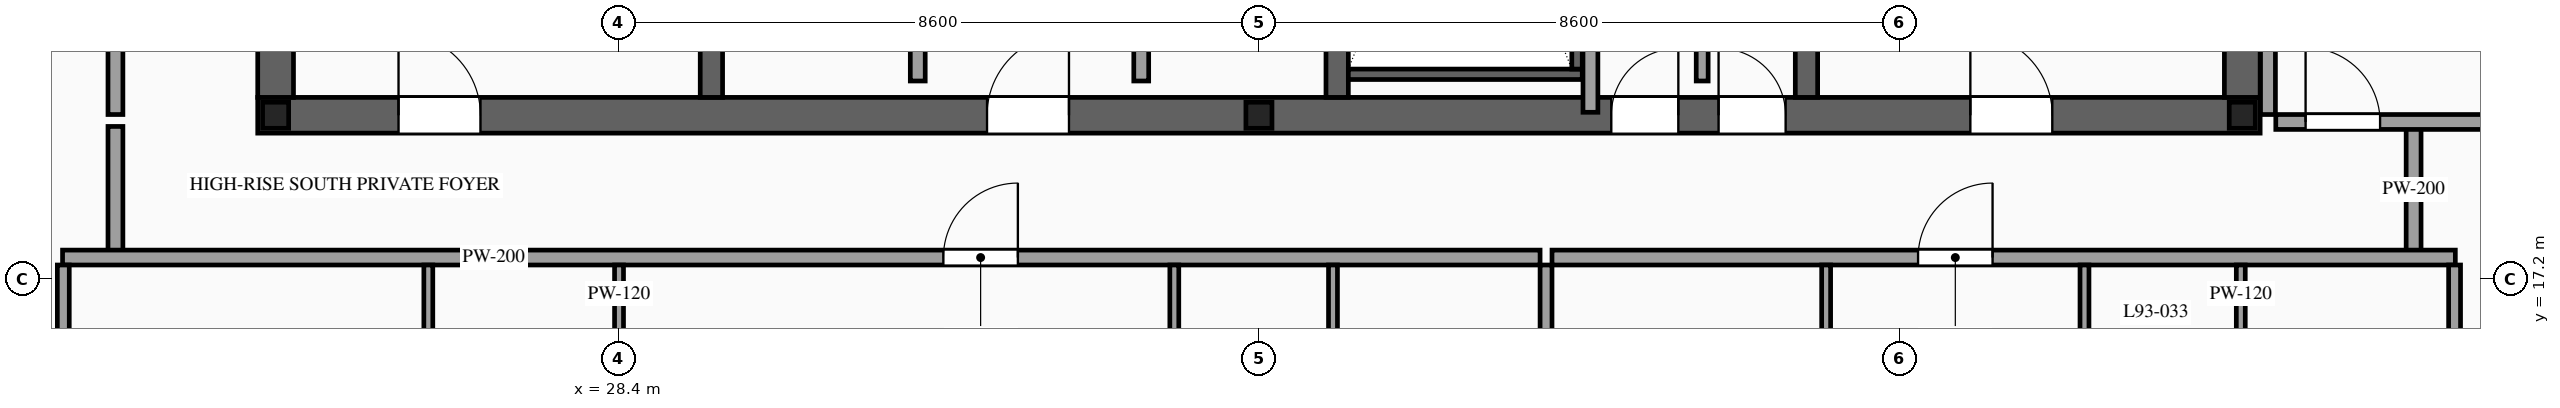
"""IFC4 building model, lengths in metres.
Left out: names, types, materials, properties, quantities, classifications, styles, units other than length and angle.
Written with IfcOpenShell. Run it as: python <this file> out.ifc"""

import sys

from ifc_helpers import new_model, si_unit, direction, frame, frame_2d, origin, origin_2d, place, context, subcontext, project, spatial, rectangle, i_section, extrude, source, transform, mapped, element, fill, save


model = new_model("IFC4")
c1 = context("Model", 3, precision=1e-05, world=origin(), true_north=direction((0.0, 1.0)))
c2 = subcontext(c1, "Body", "Model", "MODEL_VIEW")
j1 = project(units=[si_unit("LENGTHUNIT", "METRE"), si_unit("PLANEANGLEUNIT", "RADIAN")], contexts=[c1])
p1 = place(None, origin())
s1 = spatial("IfcSite", under=j1, at=p1, CompositionType="ELEMENT")
p2 = place(p1, origin())
s2 = spatial("IfcBuilding", under=s1, at=p2, CompositionType="ELEMENT")
p3 = place(p2, frame((0.0, 0.0, 347.2)))
s3 = spatial("IfcBuildingStorey", under=s2, at=p3, CompositionType="ELEMENT", Elevation=347.2)
p4 = place(p3, frame((23.56, 19.4, 0.0), z_axis=(0.0, 0.0, 1.0), x_axis=(1.0, 0.0, 0.0)))
e1 = element("IfcWall", 1, at=p4, inside=s3, PredefinedType="SHEAR", context=c2, shape_type="SweptSolid", body=[
    extrude(rectangle(XDim=26.88, YDim=0.48, at=frame_2d((13.44, 0.0))), origin(), (0.0, 0.0, 1.0), 4.0),
])
p5 = place(p4, frame((1.89, 0.0, 0.0)))
e2 = element("IfcOpeningElement", 2, at=p5, cuts=e1, PredefinedType="OPENING", context=c2, shape_type="SweptSolid", body=[
    extrude(rectangle(XDim=1.1, YDim=2.2, at=frame_2d((0.55, 1.1))), frame((0.0, 0.255, 0.0), z_axis=(0.0, -1.0, 0.0), x_axis=(1.0, 0.0, 0.0)), (0.0, 0.0, 1.0), 0.51),
])
p6 = place(p4, frame((9.79, 0.0, 0.0)))
e3 = element("IfcOpeningElement", 3, at=p6, cuts=e1, PredefinedType="OPENING", context=c2, shape_type="SweptSolid", body=[
    extrude(rectangle(XDim=1.1, YDim=2.2, at=frame_2d((0.55, 1.1))), frame((0.0, 0.255, 0.0), z_axis=(0.0, -1.0, 0.0), x_axis=(1.0, 0.0, 0.0)), (0.0, 0.0, 1.0), 0.51),
])
p7 = place(p4, frame((22.99, 0.0, 0.0)))
e4 = element("IfcOpeningElement", 4, at=p7, cuts=e1, PredefinedType="OPENING", context=c2, shape_type="SweptSolid", body=[
    extrude(rectangle(XDim=1.1, YDim=2.2, at=frame_2d((0.55, 1.1))), frame((0.0, 0.255, 0.0), z_axis=(0.0, -1.0, 0.0), x_axis=(1.0, 0.0, 0.0)), (0.0, 0.0, 1.0), 0.51),
])
p8 = place(p4, frame((19.61, 0.0, 0.0)))
e5 = element("IfcOpeningElement", 5, at=p8, cuts=e1, PredefinedType="OPENING", context=c2, shape_type="SweptSolid", body=[
    extrude(rectangle(XDim=0.9, YDim=2.15, at=frame_2d((0.45, 1.075))), frame((0.0, 0.255, 0.0), z_axis=(0.0, -1.0, 0.0), x_axis=(1.0, 0.0, 0.0)), (0.0, 0.0, 1.0), 0.51),
])
p9 = place(p4, frame((18.17, 0.0, 0.0)))
e6 = element("IfcOpeningElement", 6, at=p9, cuts=e1, PredefinedType="OPENING", context=c2, shape_type="SweptSolid", body=[
    extrude(rectangle(XDim=0.9, YDim=2.15, at=frame_2d((0.45, 1.075))), frame((0.0, 0.255, 0.0), z_axis=(0.0, -1.0, 0.0), x_axis=(1.0, 0.0, 0.0)), (0.0, 0.0, 1.0), 0.51),
])
m1 = source(origin(), c2, "Body", "SweptSolid", [
    extrude(rectangle(XDim=12.32, YDim=0.48, at=frame_2d((6.16, 0.0))), origin(), (0.0, 0.0, 1.0), 4.0),
])
for number, where, z_axis, x_axis in (
    (7, (23.8, 19.64, 0.0), (0.0, 0.0, 1.0), (0.0, 1.0, 0.0)),
    (8, (50.2, 19.64, 0.0), (0.0, 0.0, 1.0), (0.0, 1.0, 0.0)),
):
    element("IfcWall", number, at=place(p3, frame(where, z_axis=z_axis, x_axis=x_axis)), inside=s3, PredefinedType="SHEAR", context=c2, shape_type="MappedRepresentation", body=[
        mapped(m1, transform((0.0, 0.0, 0.0), scale=1.0)),
    ])
m2 = source(origin(), c2, "Body", "SweptSolid", [
    extrude(rectangle(XDim=12.32, YDim=0.3, at=frame_2d((6.16, 0.0))), origin(), (0.0, 0.0, 1.0), 4.0),
])
for number, where, z_axis, x_axis in (
    (9, (29.65, 19.64, 0.0), (0.0, 0.0, 1.0), (0.0, 1.0, 0.0)),
    (10, (38.05, 19.64, 0.0), (0.0, 0.0, 1.0), (0.0, 1.0, 0.0)),
):
    element("IfcWall", number, at=place(p3, frame(where, z_axis=z_axis, x_axis=x_axis)), inside=s3, PredefinedType="SOLIDWALL", context=c2, shape_type="MappedRepresentation", body=[
        mapped(m2, transform((0.0, 0.0, 0.0), scale=1.0)),
    ])
p10 = place(p3, frame((44.35, 19.64, 0.0), z_axis=(0.0, 0.0, 1.0), x_axis=(0.0, 1.0, 0.0)))
e11 = element("IfcWall", 11, at=p10, inside=s3, PredefinedType="SOLIDWALL", context=c2, shape_type="SweptSolid", body=[
    extrude(rectangle(XDim=12.32, YDim=0.3, at=frame_2d((6.16, 0.0))), origin(), (0.0, 0.0, 1.0), 4.0),
])
p11 = place(p10, frame((6.56, 0.0, 0.0)))
e12 = element("IfcOpeningElement", 12, at=p11, cuts=e11, PredefinedType="OPENING", context=c2, shape_type="SweptSolid", body=[
    extrude(rectangle(XDim=1.1, YDim=2.2, at=frame_2d((0.55, 1.1))), frame((0.0, 0.165, 0.0), z_axis=(0.0, -1.0, 0.0), x_axis=(1.0, 0.0, 0.0)), (0.0, 0.0, 1.0), 0.33),
])
p12 = place(p10, frame((8.66, 0.0, 0.0)))
e13 = element("IfcOpeningElement", 13, at=p12, cuts=e11, PredefinedType="OPENING", context=c2, shape_type="SweptSolid", body=[
    extrude(rectangle(XDim=1.1, YDim=2.2, at=frame_2d((0.55, 1.1))), frame((0.0, 0.165, 0.0), z_axis=(0.0, -1.0, 0.0), x_axis=(1.0, 0.0, 0.0)), (0.0, 0.0, 1.0), 0.33),
])
p13 = place(p10, frame((10.76, 0.0, 0.0)))
e14 = element("IfcOpeningElement", 14, at=p13, cuts=e11, PredefinedType="OPENING", context=c2, shape_type="SweptSolid", body=[
    extrude(rectangle(XDim=1.1, YDim=2.2, at=frame_2d((0.55, 1.1))), frame((0.0, 0.165, 0.0), z_axis=(0.0, -1.0, 0.0), x_axis=(1.0, 0.0, 0.0)), (0.0, 0.0, 1.0), 0.33),
])
m3 = source(origin(), c2, "Body", "SweptSolid", [
    extrude(i_section(OverallWidth=0.35, OverallDepth=0.35, WebThickness=0.012, FlangeThickness=0.019, at=origin_2d()), origin(), (0.0, 0.0, 1.0), 4.0),
])
for number, where, z_axis, x_axis in (
    (15, (23.8, 19.4, 0.0), (0.0, 0.0, 1.0), (1.0, 0.0, 0.0)),
    (16, (37.0, 19.4, 0.0), (0.0, 0.0, 1.0), (1.0, 0.0, 0.0)),
    (17, (50.2, 19.4, 0.0), (0.0, 0.0, 1.0), (1.0, 0.0, 0.0)),
):
    element("IfcColumn", number, at=place(p3, frame(where, z_axis=z_axis, x_axis=x_axis)), inside=s3, PredefinedType="COLUMN", context=c2, shape_type="MappedRepresentation", body=[
        mapped(m3, transform((0.0, 0.0, 0.0), scale=1.0)),
    ])
m4 = source(origin(), c2, "Body", "SweptSolid", [
    extrude(rectangle(XDim=3.14, YDim=0.14, at=frame_2d((1.57, 0.0))), origin(), (0.0, 0.0, 1.0), 3.7),
])
p14 = place(p3, frame((38.2, 19.95, 0.0), z_axis=(0.0, 0.0, 1.0), x_axis=(1.0, 0.0, 0.0)))
e18 = element("IfcWall", 18, at=p14, inside=s3, PredefinedType="SOLIDWALL", context=c2, shape_type="MappedRepresentation", body=[
    mapped(m4, transform((0.0, 0.0, 0.0), scale=1.0)),
])
m5 = source(origin(), c2, "Body", "SweptSolid", [
    extrude(rectangle(XDim=8.94, YDim=0.14, at=frame_2d((4.47, 0.0))), origin(), (0.0, 0.0, 1.0), 3.7),
])
p15 = place(p3, frame((41.27, 20.02, 0.0), z_axis=(0.0, 0.0, 1.0), x_axis=(0.0, 1.0, 0.0)))
e19 = element("IfcWall", 19, at=p15, inside=s3, PredefinedType="SOLIDWALL", context=c2, shape_type="MappedRepresentation", body=[
    mapped(m5, transform((0.0, 0.0, 0.0), scale=1.0)),
])
p16 = place(p3, frame((32.42, 19.86, 0.0), z_axis=(0.0, 0.0, 1.0), x_axis=(0.0, 1.0, 0.0)))
e20 = element("IfcWall", 20, at=p16, inside=s3, PredefinedType="PARTITIONING", context=c2, shape_type="SweptSolid", body=[
    extrude(rectangle(XDim=7.94, YDim=0.2, at=frame_2d((3.97, 0.0))), origin(), (0.0, 0.0, 1.0), 3.7),
])
p17 = place(p16, frame((3.52, 0.0, 0.0)))
e21 = element("IfcOpeningElement", 21, at=p17, cuts=e20, PredefinedType="OPENING", context=c2, shape_type="SweptSolid", body=[
    extrude(rectangle(XDim=0.9, YDim=2.15, at=frame_2d((0.45, 1.075))), frame((0.0, 0.115, 0.0), z_axis=(0.0, -1.0, 0.0), x_axis=(1.0, 0.0, 0.0)), (0.0, 0.0, 1.0), 0.23),
])
p18 = place(p3, frame((35.42, 19.86, 0.0), z_axis=(0.0, 0.0, 1.0), x_axis=(0.0, 1.0, 0.0)))
e22 = element("IfcWall", 22, at=p18, inside=s3, PredefinedType="PARTITIONING", context=c2, shape_type="SweptSolid", body=[
    extrude(rectangle(XDim=6.34, YDim=0.2, at=frame_2d((3.17, 0.0))), origin(), (0.0, 0.0, 1.0), 3.7),
])
p19 = place(p18, frame((2.72, 0.0, 0.0)))
e23 = element("IfcOpeningElement", 23, at=p19, cuts=e22, PredefinedType="OPENING", context=c2, shape_type="SweptSolid", body=[
    extrude(rectangle(XDim=0.9, YDim=2.15, at=frame_2d((0.45, 1.075))), frame((0.0, 0.115, 0.0), z_axis=(0.0, -1.0, 0.0), x_axis=(1.0, 0.0, 0.0)), (0.0, 0.0, 1.0), 0.23),
])
m6 = source(origin(), c2, "Body", "SweptSolid", [
    extrude(rectangle(XDim=1.34, YDim=0.16, at=frame_2d((0.67, 0.0))), origin(), (0.0, 0.0, 1.0), 3.7),
])
p20 = place(p3, frame((42.95, 19.86, 0.0), z_axis=(0.0, 0.0, 1.0), x_axis=(0.0, 1.0, 0.0)))
e24 = element("IfcWall", 24, at=p20, inside=s3, PredefinedType="PARTITIONING", context=c2, shape_type="MappedRepresentation", body=[
    mapped(m6, transform((0.0, 0.0, 0.0), scale=1.0)),
])
m7 = source(origin(), c2, "Body", "SweptSolid", [
    extrude(rectangle(XDim=6.06, YDim=0.2, at=frame_2d((3.03, 0.0))), origin(), (0.0, 0.0, 1.0), 3.7),
])
p21 = place(p3, frame((41.45, 19.44, 0.0), z_axis=(0.0, 0.0, 1.0), x_axis=(0.0, 1.0, 0.0)))
e25 = element("IfcWall", 25, at=p21, inside=s3, PredefinedType="PARTITIONING", context=c2, shape_type="MappedRepresentation", body=[
    mapped(m7, transform((0.0, 0.0, 0.0), scale=1.0)),
])
m8 = source(origin(), c2, "Body", "SweptSolid", [
    extrude(rectangle(XDim=1.7, YDim=0.2, at=frame_2d((0.85, 0.0))), origin(), (0.0, 0.0, 1.0), 3.7),
])
for number, where, z_axis, x_axis in (
    (26, (21.65, 17.55, 0.0), (0.0, 0.0, 1.0), (0.0, 1.0, 0.0)),
    (27, (52.5, 17.55, 0.0), (0.0, 0.0, 1.0), (0.0, 1.0, 0.0)),
):
    element("IfcWall", number, at=place(p3, frame(where, z_axis=z_axis, x_axis=x_axis)), inside=s3, PredefinedType="PARTITIONING", context=c2, shape_type="MappedRepresentation", body=[
        mapped(m8, transform((0.0, 0.0, 0.0), scale=1.0)),
    ])
p22 = place(p3, frame((20.94, 17.49, 0.0), z_axis=(0.0, 0.0, 1.0), x_axis=(1.0, 0.0, 0.0)))
e28 = element("IfcWall", 28, at=p22, inside=s3, PredefinedType="PARTITIONING", context=c2, shape_type="SweptSolid", body=[
    extrude(rectangle(XDim=19.834, YDim=0.2, at=frame_2d((9.917, 0.0))), origin(), (0.0, 0.0, 1.0), 3.7),
])
p23 = place(p22, frame((11.824, 0.0, 0.0)))
e29 = element("IfcOpeningElement", 29, at=p23, cuts=e28, PredefinedType="OPENING", context=c2, shape_type="SweptSolid", body=[
    extrude(rectangle(XDim=1.0, YDim=2.2, at=frame_2d((0.5, 1.1))), frame((0.0, 0.115, 0.0), z_axis=(0.0, -1.0, 0.0), x_axis=(1.0, 0.0, 0.0)), (0.0, 0.0, 1.0), 0.23),
])
m9 = source(origin(), c2, "Body", "SweptSolid", [
    extrude(rectangle(XDim=10.54, YDim=0.16, at=frame_2d((5.27, 0.0))), origin(), (0.0, 0.0, 1.0), 3.7),
])
p24 = place(p3, frame((40.854, 6.85, 0.0), z_axis=(0.0, 0.0, 1.0), x_axis=(0.0, 1.0, 0.0)))
e30 = element("IfcWall", 30, at=p24, inside=s3, PredefinedType="PARTITIONING", context=c2, shape_type="MappedRepresentation", body=[
    mapped(m9, transform((0.0, 0.0, 0.0), scale=1.0)),
])
m10 = source(origin(), c2, "Body", "SweptSolid", [
    extrude(rectangle(XDim=2.9, YDim=0.12, at=frame_2d((1.45, 0.0))), origin(), (0.0, 0.0, 1.0), 3.7),
])
p25 = place(p3, frame((25.85, 14.49, 0.0), z_axis=(0.0, 0.0, 1.0), x_axis=(0.0, 1.0, 0.0)))
e31 = element("IfcWall", 31, at=p25, inside=s3, PredefinedType="PARTITIONING", context=c2, shape_type="MappedRepresentation", body=[
    mapped(m10, transform((0.0, 0.0, 0.0), scale=1.0)),
])
p26 = place(p3, frame((28.41, 14.49, 0.0), z_axis=(0.0, 0.0, 1.0), x_axis=(0.0, 1.0, 0.0)))
e32 = element("IfcWall", 32, at=p26, inside=s3, PredefinedType="PARTITIONING", context=c2, shape_type="SweptSolid", body=[
    extrude(rectangle(XDim=2.9, YDim=0.12, at=frame_2d((1.45, 0.0))), origin(), (0.0, 0.0, 1.0), 3.7),
])
p27 = place(p26, frame((1.025, 0.0, 0.0)))
e33 = element("IfcOpeningElement", 33, at=p27, cuts=e32, PredefinedType="OPENING", context=c2, shape_type="SweptSolid", body=[
    extrude(rectangle(XDim=0.85, YDim=2.1, at=frame_2d((0.425, 1.05))), frame((0.0, 0.075, 0.0), z_axis=(0.0, -1.0, 0.0), x_axis=(1.0, 0.0, 0.0)), (0.0, 0.0, 1.0), 0.15),
])
for number, where, z_axis, x_axis in (
    (34, (37.994, 14.49, 0.0), (0.0, 0.0, 1.0), (0.0, 1.0, 0.0)),
    (35, (35.864, 14.49, 0.0), (0.0, 0.0, 1.0), (0.0, 1.0, 0.0)),
):
    element("IfcWall", number, at=place(p3, frame(where, z_axis=z_axis, x_axis=x_axis)), inside=s3, PredefinedType="PARTITIONING", context=c2, shape_type="MappedRepresentation", body=[
        mapped(m10, transform((0.0, 0.0, 0.0), scale=1.0)),
    ])
p28 = place(p3, frame((40.934, 17.49, 0.0), z_axis=(0.0, 0.0, 1.0), x_axis=(1.0, 0.0, 0.0)))
e36 = element("IfcWall", 36, at=p28, inside=s3, PredefinedType="PARTITIONING", context=c2, shape_type="SweptSolid", body=[
    extrude(rectangle(XDim=12.126, YDim=0.2, at=frame_2d((6.063, 0.0))), origin(), (0.0, 0.0, 1.0), 3.7),
])
p29 = place(p28, frame((4.914, 0.0, 0.0)))
e37 = element("IfcOpeningElement", 37, at=p29, cuts=e36, PredefinedType="OPENING", context=c2, shape_type="SweptSolid", body=[
    extrude(rectangle(XDim=1.0, YDim=2.2, at=frame_2d((0.5, 1.1))), frame((0.0, 0.115, 0.0), z_axis=(0.0, -1.0, 0.0), x_axis=(1.0, 0.0, 0.0)), (0.0, 0.0, 1.0), 0.23),
])
m11 = source(origin(), c2, "Body", "SweptSolid", [
    extrude(rectangle(XDim=10.39, YDim=0.16, at=frame_2d((5.195, 0.0))), origin(), (0.0, 0.0, 1.0), 3.7),
])
for number, where, z_axis, x_axis in (
    (38, (20.95, 7.0, 0.0), (0.0, 0.0, 1.0), (0.0, 1.0, 0.0)),
    (39, (53.05, 7.0, 0.0), (0.0, 0.0, 1.0), (0.0, 1.0, 0.0)),
):
    element("IfcWall", number, at=place(p3, frame(where, z_axis=z_axis, x_axis=x_axis)), inside=s3, PredefinedType="PARTITIONING", context=c2, shape_type="MappedRepresentation", body=[
        mapped(m11, transform((0.0, 0.0, 0.0), scale=1.0)),
    ])
p30 = place(p3, frame((44.614, 14.49, 0.0), z_axis=(0.0, 0.0, 1.0), x_axis=(0.0, 1.0, 0.0)))
e40 = element("IfcWall", 40, at=p30, inside=s3, PredefinedType="PARTITIONING", context=c2, shape_type="MappedRepresentation", body=[
    mapped(m10, transform((0.0, 0.0, 0.0), scale=1.0)),
])
p31 = place(p3, frame((50.18, 14.49, 0.0), z_axis=(0.0, 0.0, 1.0), x_axis=(0.0, 1.0, 0.0)))
e41 = element("IfcWall", 41, at=p31, inside=s3, PredefinedType="PARTITIONING", context=c2, shape_type="SweptSolid", body=[
    extrude(rectangle(XDim=2.9, YDim=0.12, at=frame_2d((1.45, 0.0))), origin(), (0.0, 0.0, 1.0), 3.245),
])
p32 = place(p31, frame((1.025, 0.0, 0.0)))
e42 = element("IfcOpeningElement", 42, at=p32, cuts=e41, PredefinedType="OPENING", context=c2, shape_type="SweptSolid", body=[
    extrude(rectangle(XDim=0.85, YDim=2.1, at=frame_2d((0.425, 1.05))), frame((0.0, 0.075, 0.0), z_axis=(0.0, -1.0, 0.0), x_axis=(1.0, 0.0, 0.0)), (0.0, 0.0, 1.0), 0.15),
])
p33 = place(p3, frame((48.082, 14.49, 0.0), z_axis=(0.0, 0.0, 1.0), x_axis=(0.0, 1.0, 0.0)))
e43 = element("IfcWall", 43, at=p33, inside=s3, PredefinedType="PARTITIONING", context=c2, shape_type="SweptSolid", body=[
    extrude(rectangle(XDim=2.9, YDim=0.12, at=frame_2d((1.45, 0.0))), origin(), (0.0, 0.0, 1.0), 3.7),
])
p34 = place(p33, frame((1.025, 0.0, 0.0)))
e44 = element("IfcOpeningElement", 44, at=p34, cuts=e43, PredefinedType="OPENING", context=c2, shape_type="SweptSolid", body=[
    extrude(rectangle(XDim=0.85, YDim=2.1, at=frame_2d((0.425, 1.05))), frame((0.0, 0.075, 0.0), z_axis=(0.0, -1.0, 0.0), x_axis=(1.0, 0.0, 0.0)), (0.0, 0.0, 1.0), 0.15),
])
p35 = place(p3, frame((21.65, 19.41, 0.0), z_axis=(0.0, 0.0, 1.0), x_axis=(0.0, 1.0, 0.0)))
e45 = element("IfcWall", 45, at=p35, inside=s3, PredefinedType="PARTITIONING", context=c2, shape_type="SweptSolid", body=[
    extrude(rectangle(XDim=12.78, YDim=0.2, at=frame_2d((6.39, 0.0))), origin(), (0.0, 0.0, 1.0), 3.7),
])
p36 = place(p35, frame((5.89, 0.0, 0.0)))
e46 = element("IfcOpeningElement", 46, at=p36, cuts=e45, PredefinedType="OPENING", context=c2, shape_type="SweptSolid", body=[
    extrude(rectangle(XDim=1.0, YDim=2.2, at=frame_2d((0.5, 1.1))), frame((0.0, 0.115, 0.0), z_axis=(0.0, -1.0, 0.0), x_axis=(1.0, 0.0, 0.0)), (0.0, 0.0, 1.0), 0.23),
])
p37 = place(p3, frame((50.65, 19.31, 0.0), z_axis=(0.0, 0.0, 1.0), x_axis=(1.0, 0.0, 0.0)))
e47 = element("IfcWall", 47, at=p37, inside=s3, PredefinedType="PARTITIONING", context=c2, shape_type="SweptSolid", body=[
    extrude(rectangle(XDim=5.3, YDim=0.2, at=frame_2d((2.65, 0.0))), origin(), (0.0, 0.0, 1.0), 3.245),
])
p38 = place(p37, frame((0.4, 0.0, 0.0)))
e48 = element("IfcOpeningElement", 48, at=p38, cuts=e47, PredefinedType="OPENING", context=c2, shape_type="SweptSolid", body=[
    extrude(rectangle(XDim=1.0, YDim=2.2, at=frame_2d((0.5, 1.1))), frame((0.0, 0.115, 0.0), z_axis=(0.0, -1.0, 0.0), x_axis=(1.0, 0.0, 0.0)), (0.0, 0.0, 1.0), 0.23),
])
m12 = source(origin(), c2, "Body", "SweptSolid", [
    extrude(rectangle(XDim=12.78, YDim=0.2, at=frame_2d((6.39, 0.0))), origin(), (0.0, 0.0, 1.0), 3.7),
])
p39 = place(p3, frame((50.545, 19.41, 0.0), z_axis=(0.0, 0.0, 1.0), x_axis=(0.0, 1.0, 0.0)))
e49 = element("IfcWall", 49, at=p39, inside=s3, PredefinedType="PARTITIONING", context=c2, shape_type="MappedRepresentation", body=[
    mapped(m12, transform((0.0, 0.0, 0.0), scale=1.0)),
])
m13 = source(origin(), c2, "Body", "SweptSolid", [
    extrude(rectangle(XDim=1.1, YDim=2.2, at=frame_2d((0.55, 1.1))), frame((0.0, 0.025, 0.0), z_axis=(0.0, -1.0, 0.0), x_axis=(1.0, 0.0, 0.0)), (0.0, 0.0, 1.0), 0.05),
])
p40 = place(p5, origin())
e50 = element("IfcDoor", 50, at=p40, inside=s3, OperationType="SINGLE_SWING_LEFT", PredefinedType="DOOR", context=c2, shape_type="MappedRepresentation", body=[
    mapped(m13, transform((0.0, 0.0, 0.0), scale=1.0)),
])
fill(e2, e50)
p41 = place(p6, origin())
e51 = element("IfcDoor", 51, at=p41, inside=s3, OperationType="SINGLE_SWING_RIGHT", PredefinedType="DOOR", context=c2, shape_type="MappedRepresentation", body=[
    mapped(m13, transform((0.0, 0.0, 0.0), scale=1.0)),
])
fill(e3, e51)
p42 = place(p7, origin())
e52 = element("IfcDoor", 52, at=p42, inside=s3, OperationType="SINGLE_SWING_LEFT", PredefinedType="DOOR", context=c2, shape_type="MappedRepresentation", body=[
    mapped(m13, transform((0.0, 0.0, 0.0), scale=1.0)),
])
fill(e4, e52)
m14 = source(origin(), c2, "Body", "SweptSolid", [
    extrude(rectangle(XDim=0.9, YDim=2.15, at=frame_2d((0.45, 1.075))), frame((0.0, 0.025, 0.0), z_axis=(0.0, -1.0, 0.0), x_axis=(1.0, 0.0, 0.0)), (0.0, 0.0, 1.0), 0.05),
])
p43 = place(p8, origin())
e53 = element("IfcDoor", 53, at=p43, inside=s3, OperationType="SINGLE_SWING_LEFT", PredefinedType="DOOR", context=c2, shape_type="MappedRepresentation", body=[
    mapped(m14, transform((0.0, 0.0, 0.0), scale=1.0)),
])
fill(e5, e53)
p44 = place(p9, origin())
e54 = element("IfcDoor", 54, at=p44, inside=s3, OperationType="SINGLE_SWING_RIGHT", PredefinedType="DOOR", context=c2, shape_type="MappedRepresentation", body=[
    mapped(m14, transform((0.0, 0.0, 0.0), scale=1.0)),
])
fill(e6, e54)
m15 = source(origin(), c2, "Body", "SweptSolid", [
    extrude(rectangle(XDim=1.0, YDim=2.2, at=frame_2d((0.5, 1.1))), frame((0.0, 0.025, 0.0), z_axis=(0.0, -1.0, 0.0), x_axis=(1.0, 0.0, 0.0)), (0.0, 0.0, 1.0), 0.05),
])
p45 = place(p23, origin())
e55 = element("IfcDoor", 55, at=p45, inside=s3, OperationType="SINGLE_SWING_RIGHT", PredefinedType="DOOR", context=c2, shape_type="MappedRepresentation", body=[
    mapped(m15, transform((0.0, 0.0, 0.0), scale=1.0)),
])
fill(e29, e55)
p46 = place(p29, origin())
e56 = element("IfcDoor", 56, at=p46, inside=s3, OperationType="SINGLE_SWING_RIGHT", PredefinedType="DOOR", context=c2, shape_type="MappedRepresentation", body=[
    mapped(m15, transform((0.0, 0.0, 0.0), scale=1.0)),
])
fill(e37, e56)
p47 = place(p38, origin())
e57 = element("IfcDoor", 57, at=p47, inside=s3, OperationType="SINGLE_SWING_LEFT", PredefinedType="DOOR", context=c2, shape_type="MappedRepresentation", body=[
    mapped(m15, transform((0.0, 0.0, 0.0), scale=1.0)),
])
fill(e48, e57)
save(model, sys.argv[1])
